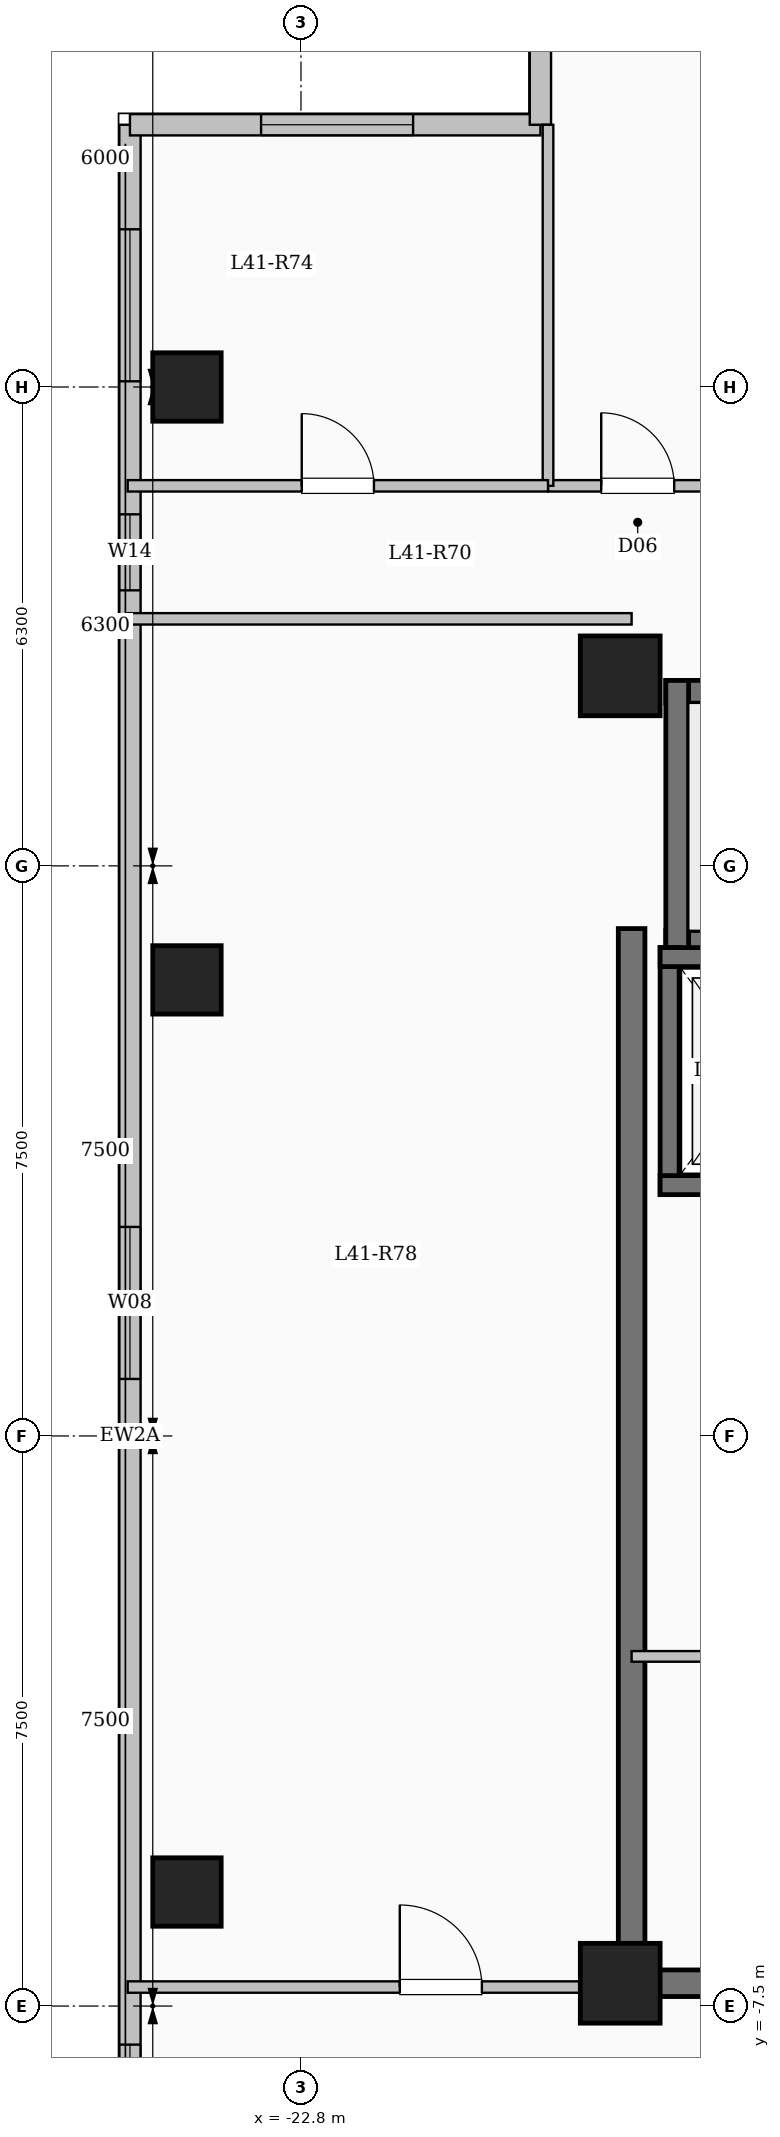
"""IFC4 building model, lengths in metres.
Left out: names, types, materials, properties, quantities, classifications, styles, units other than length and angle.
Written with IfcOpenShell. Run it as: python <this file> out.ifc"""

import sys

from ifc_helpers import new_model, si_unit, direction, frame, frame_2d, origin, origin_2d, place, context, subcontext, project, spatial, rectangle, extrude, element, fill, save


model = new_model("IFC4")
c1 = context("Model", 3, precision=1e-05, world=origin(), true_north=direction((0.0, 1.0)))
c2 = subcontext(c1, "Body", "Model", "MODEL_VIEW")
j1 = project(units=[si_unit("LENGTHUNIT", "METRE"), si_unit("PLANEANGLEUNIT", "RADIAN")], contexts=[c1])
p1 = place(None, origin())
s1 = spatial("IfcSite", under=j1, at=p1, CompositionType="ELEMENT")
p2 = place(p1, origin())
s2 = spatial("IfcBuilding", under=s1, at=p2, CompositionType="ELEMENT")
p3 = place(p2, frame((0.0, 0.0, 152.7)))
s3 = spatial("IfcBuildingStorey", under=s2, at=p3, CompositionType="ELEMENT", Elevation=152.7)
for number, where, z_axis, x_axis in (
    (1, (-18.6, -7.2, 0.0), (0.0, 0.0, 1.0), (1.0, 0.0, 0.0)),
    (2, (-18.6, 10.0, 0.0), (0.0, 0.0, 1.0), (1.0, 0.0, 0.0)),
):
    element("IfcColumn", number, at=place(p3, frame(where, z_axis=z_axis, x_axis=x_axis)), inside=s3, PredefinedType="COLUMN", context=c2, shape_type="SweptSolid", body=[
        extrude(rectangle(XDim=1.05, YDim=1.05, at=origin_2d()), origin(), (0.0, 0.0, 1.0), 3.35),
    ])
for number, where, z_axis, x_axis in (
    (3, (-24.3, -6.0, 0.0), (0.0, 0.0, 1.0), (1.0, 0.0, 0.0)),
    (4, (-24.3, 6.0, 0.0), (0.0, 0.0, 1.0), (1.0, 0.0, 0.0)),
    (5, (-24.3, 13.8, 0.0), (0.0, 0.0, 1.0), (1.0, 0.0, 0.0)),
):
    element("IfcColumn", number, at=place(p3, frame(where, z_axis=z_axis, x_axis=x_axis)), inside=s3, PredefinedType="COLUMN", context=c2, shape_type="SweptSolid", body=[
        extrude(rectangle(XDim=0.9, YDim=0.9, at=origin_2d()), origin(), (0.0, 0.0, 1.0), 3.35),
    ])
p4 = place(p3, frame((-25.05, -17.25, 0.0), z_axis=(0.0, 0.0, 1.0), x_axis=(0.0, 1.0, 0.0)))
e6 = element("IfcWall", 6, at=p4, inside=s3, PredefinedType="SOLIDWALL", context=c2, shape_type="SweptSolid", body=[
    extrude(rectangle(XDim=34.5, YDim=0.28, at=frame_2d((17.25, 0.0))), origin(), (0.0, 0.0, 1.0), 3.1),
])
p5 = place(p4, frame((2.35, 0.0, 0.9)))
e7 = element("IfcOpeningElement", 7, at=p5, cuts=e6, PredefinedType="OPENING", context=c2, shape_type="SweptSolid", body=[
    extrude(rectangle(XDim=2.2, YDim=1.75, at=frame_2d((1.1, 0.875))), frame((0.0, 0.15, 0.0), z_axis=(0.0, -1.0, 0.0), x_axis=(1.0, 0.0, 0.0)), (0.0, 0.0, 1.0), 0.3),
])
p6 = place(p4, frame((7.742, 0.0, 0.9)))
e8 = element("IfcOpeningElement", 8, at=p6, cuts=e6, PredefinedType="OPENING", context=c2, shape_type="SweptSolid", body=[
    extrude(rectangle(XDim=1.5, YDim=1.65, at=frame_2d((0.75, 0.825))), frame((0.0, 0.15, 0.0), z_axis=(0.0, -1.0, 0.0), x_axis=(1.0, 0.0, 0.0)), (0.0, 0.0, 1.0), 0.3),
])
p7 = place(p4, frame((18.0, 0.0, 0.9)))
e9 = element("IfcOpeningElement", 9, at=p7, cuts=e6, PredefinedType="OPENING", context=c2, shape_type="SweptSolid", body=[
    extrude(rectangle(XDim=2.0, YDim=1.7, at=frame_2d((1.0, 0.85))), frame((0.0, 0.15, 0.0), z_axis=(0.0, -1.0, 0.0), x_axis=(1.0, 0.0, 0.0)), (0.0, 0.0, 1.0), 0.3),
])
p8 = place(p4, frame((28.375, 0.0, 0.95)))
e10 = element("IfcOpeningElement", 10, at=p8, cuts=e6, PredefinedType="OPENING", context=c2, shape_type="SweptSolid", body=[
    extrude(rectangle(XDim=1.0, YDim=1.5, at=frame_2d((0.5, 0.75))), frame((0.0, 0.15, 0.0), z_axis=(0.0, -1.0, 0.0), x_axis=(1.0, 0.0, 0.0)), (0.0, 0.0, 1.0), 0.3),
])
p9 = place(p4, frame((31.125, 0.0, 0.9)))
e11 = element("IfcOpeningElement", 11, at=p9, cuts=e6, PredefinedType="OPENING", context=c2, shape_type="SweptSolid", body=[
    extrude(rectangle(XDim=2.0, YDim=1.7, at=frame_2d((1.0, 0.85))), frame((0.0, 0.15, 0.0), z_axis=(0.0, -1.0, 0.0), x_axis=(1.0, 0.0, 0.0)), (0.0, 0.0, 1.0), 0.3),
])
p10 = place(p3, frame((-25.05, 17.25, 0.0), z_axis=(0.0, 0.0, 1.0), x_axis=(1.0, 0.0, 0.0)))
e12 = element("IfcWall", 12, at=p10, inside=s3, PredefinedType="SOLIDWALL", context=c2, shape_type="SweptSolid", body=[
    extrude(rectangle(XDim=5.4, YDim=0.28, at=frame_2d((2.7, 0.0))), origin(), (0.0, 0.0, 1.0), 3.1),
])
p11 = place(p10, frame((1.725, 0.0, 0.9)))
e13 = element("IfcOpeningElement", 13, at=p11, cuts=e12, PredefinedType="OPENING", context=c2, shape_type="SweptSolid", body=[
    extrude(rectangle(XDim=2.0, YDim=1.7, at=frame_2d((1.0, 0.85))), frame((0.0, 0.15, 0.0), z_axis=(0.0, -1.0, 0.0), x_axis=(1.0, 0.0, 0.0)), (0.0, 0.0, 1.0), 0.3),
])
p12 = place(p3, frame((-19.65, 17.25, 0.0), z_axis=(0.0, 0.0, 1.0), x_axis=(0.0, 1.0, 0.0)))
e14 = element("IfcWall", 14, at=p12, inside=s3, PredefinedType="SOLIDWALL", context=c2, shape_type="SweptSolid", body=[
    extrude(rectangle(XDim=3.9, YDim=0.28, at=frame_2d((1.95, 0.0))), origin(), (0.0, 0.0, 1.0), 3.1),
])
p13 = place(p12, frame((1.107, 0.0, 0.9)))
e15 = element("IfcOpeningElement", 15, at=p13, cuts=e14, PredefinedType="OPENING", context=c2, shape_type="SweptSolid", body=[
    extrude(rectangle(XDim=1.65, YDim=1.6, at=frame_2d((0.825, 0.8))), frame((0.0, 0.15, 0.0), z_axis=(0.0, -1.0, 0.0), x_axis=(1.0, 0.0, 0.0)), (0.0, 0.0, 1.0), 0.3),
])
p14 = place(p3, frame((-18.0, 9.79, 0.0), z_axis=(0.0, 0.0, 1.0), x_axis=(1.0, 0.0, 0.0)))
e16 = element("IfcWall", 16, at=p14, inside=s3, PredefinedType="SHEAR", context=c2, shape_type="SweptSolid", body=[
    extrude(rectangle(XDim=8.0, YDim=0.3, at=frame_2d((4.0, 0.0))), origin(), (0.0, 0.0, 1.0), 3.35),
])
p15 = place(p3, frame((-18.0, 6.5, 0.0), z_axis=(0.0, 0.0, 1.0), x_axis=(1.0, 0.0, 0.0)))
e17 = element("IfcWall", 17, at=p15, inside=s3, PredefinedType="SHEAR", context=c2, shape_type="SweptSolid", body=[
    extrude(rectangle(XDim=8.0, YDim=0.3, at=frame_2d((4.0, 0.0))), origin(), (0.0, 0.0, 1.0), 3.35),
])
p16 = place(p15, frame((6.45, 0.0, 0.0)))
e18 = element("IfcOpeningElement", 18, at=p16, cuts=e17, PredefinedType="OPENING", context=c2, shape_type="SweptSolid", body=[
    extrude(rectangle(XDim=1.0, YDim=2.15, at=frame_2d((0.5, 1.075))), frame((0.0, 0.16, 0.0), z_axis=(0.0, -1.0, 0.0), x_axis=(1.0, 0.0, 0.0)), (0.0, 0.0, 1.0), 0.32),
])
p17 = place(p3, frame((-17.85, 6.35, 0.0), z_axis=(0.0, 0.0, 1.0), x_axis=(0.0, 1.0, 0.0)))
e19 = element("IfcWall", 19, at=p17, inside=s3, PredefinedType="SHEAR", context=c2, shape_type="SweptSolid", body=[
    extrude(rectangle(XDim=3.59, YDim=0.3, at=frame_2d((1.795, 0.0))), origin(), (0.0, 0.0, 1.0), 3.35),
])
p18 = place(p3, frame((-17.95, 3.175, 0.0), z_axis=(0.0, 0.0, 1.0), x_axis=(0.0, 1.0, 0.0)))
e20 = element("IfcWall", 20, at=p18, inside=s3, PredefinedType="SHEAR", context=c2, shape_type="SweptSolid", body=[
    extrude(rectangle(XDim=3.25, YDim=0.25, at=frame_2d((1.625, 0.0))), origin(), (0.0, 0.0, 1.0), 3.35),
])
for number, where, z_axis, x_axis in (
    (21, (-18.075, 3.3, 0.0), (0.0, 0.0, 1.0), (1.0, 0.0, 0.0)),
    (22, (-18.075, 6.3, 0.0), (0.0, 0.0, 1.0), (1.0, 0.0, 0.0)),
):
    element("IfcWall", number, at=place(p3, frame(where, z_axis=z_axis, x_axis=x_axis)), inside=s3, PredefinedType="SHEAR", context=c2, shape_type="SweptSolid", body=[
        extrude(rectangle(XDim=2.55, YDim=0.25, at=frame_2d((1.275, 0.0))), origin(), (0.0, 0.0, 1.0), 3.35),
    ])
p19 = place(p3, frame((-18.45, -7.375, 0.0), z_axis=(0.0, 0.0, 1.0), x_axis=(0.0, 1.0, 0.0)))
e23 = element("IfcWall", 23, at=p19, inside=s3, PredefinedType="SHEAR", context=c2, shape_type="SweptSolid", body=[
    extrude(rectangle(XDim=14.05, YDim=0.35, at=frame_2d((7.025, 0.0))), origin(), (0.0, 0.0, 1.0), 3.35),
])
p20 = place(p3, frame((-18.625, -7.2, 0.0), z_axis=(0.0, 0.0, 1.0), x_axis=(1.0, 0.0, 0.0)))
e24 = element("IfcWall", 24, at=p20, inside=s3, PredefinedType="SHEAR", context=c2, shape_type="SweptSolid", body=[
    extrude(rectangle(XDim=8.55, YDim=0.35, at=frame_2d((4.275, 0.0))), origin(), (0.0, 0.0, 1.0), 3.35),
])
p21 = place(p3, frame((-18.45, -2.9, 0.0), z_axis=(0.0, 0.0, 1.0), x_axis=(1.0, 0.0, 0.0)))
e25 = element("IfcWall", 25, at=p21, inside=s3, PredefinedType="PARTITIONING", context=c2, shape_type="SweptSolid", body=[
    extrude(rectangle(XDim=3.05, YDim=0.14, at=frame_2d((1.525, 0.0))), origin(), (0.0, 0.0, 1.0), 3.1),
])
p22 = place(p21, frame((1.05, 0.0, 0.0)))
e26 = element("IfcOpeningElement", 26, at=p22, cuts=e25, PredefinedType="OPENING", context=c2, shape_type="SweptSolid", body=[
    extrude(rectangle(XDim=0.9, YDim=2.08, at=frame_2d((0.45, 1.04))), frame((0.0, 0.08, 0.0), z_axis=(0.0, -1.0, 0.0), x_axis=(1.0, 0.0, 0.0)), (0.0, 0.0, 1.0), 0.16),
])
p23 = place(p3, frame((-19.55, 12.5, 0.0), z_axis=(0.0, 0.0, 1.0), x_axis=(1.0, 0.0, 0.0)))
e27 = element("IfcWall", 27, at=p23, inside=s3, PredefinedType="PARTITIONING", context=c2, shape_type="SweptSolid", body=[
    extrude(rectangle(XDim=15.7, YDim=0.15, at=frame_2d((7.85, 0.0))), origin(), (0.0, 0.0, 1.0), 3.1),
])
p24 = place(p23, frame((0.7, 0.0, 0.0)))
e28 = element("IfcOpeningElement", 28, at=p24, cuts=e27, PredefinedType="OPENING", context=c2, shape_type="SweptSolid", body=[
    extrude(rectangle(XDim=0.96, YDim=2.15, at=frame_2d((0.48, 1.075))), frame((0.0, 0.085, 0.0), z_axis=(0.0, -1.0, 0.0), x_axis=(1.0, 0.0, 0.0)), (0.0, 0.0, 1.0), 0.17),
])
p25 = place(p23, frame((10.348, 0.0, 0.0)))
e29 = element("IfcOpeningElement", 29, at=p25, cuts=e27, PredefinedType="OPENING", context=c2, shape_type="SweptSolid", body=[
    extrude(rectangle(XDim=0.96, YDim=2.15, at=frame_2d((0.48, 1.075))), frame((0.0, 0.085, 0.0), z_axis=(0.0, -1.0, 0.0), x_axis=(1.0, 0.0, 0.0)), (0.0, 0.0, 1.0), 0.17),
])
p26 = place(p3, frame((-25.08, -7.25, 0.0), z_axis=(0.0, 0.0, 1.0), x_axis=(1.0, 0.0, 0.0)))
e30 = element("IfcWall", 30, at=p26, inside=s3, PredefinedType="PARTITIONING", context=c2, shape_type="SweptSolid", body=[
    extrude(rectangle(XDim=6.63, YDim=0.15, at=frame_2d((3.315, 0.0))), origin(), (0.0, 0.0, 1.0), 3.1),
])
p27 = place(p26, frame((3.58, 0.0, 0.0)))
e31 = element("IfcOpeningElement", 31, at=p27, cuts=e30, PredefinedType="OPENING", context=c2, shape_type="SweptSolid", body=[
    extrude(rectangle(XDim=1.08, YDim=2.15, at=frame_2d((0.54, 1.075))), frame((0.0, 0.085, 0.0), z_axis=(0.0, -1.0, 0.0), x_axis=(1.0, 0.0, 0.0)), (0.0, 0.0, 1.0), 0.17),
])
p28 = place(p3, frame((-25.08, 10.75, 0.0), z_axis=(0.0, 0.0, 1.0), x_axis=(1.0, 0.0, 0.0)))
e32 = element("IfcWall", 32, at=p28, inside=s3, PredefinedType="PARTITIONING", context=c2, shape_type="SweptSolid", body=[
    extrude(rectangle(XDim=6.63, YDim=0.15, at=frame_2d((3.315, 0.0))), origin(), (0.0, 0.0, 1.0), 3.1),
])
p29 = place(p3, frame((-19.55, 12.5, 0.0), z_axis=(0.0, 0.0, 1.0), x_axis=(0.0, 1.0, 0.0)))
e33 = element("IfcWall", 33, at=p29, inside=s3, PredefinedType="PARTITIONING", context=c2, shape_type="SweptSolid", body=[
    extrude(rectangle(XDim=4.75, YDim=0.14, at=frame_2d((2.375, 0.0))), origin(), (0.0, 0.0, 1.0), 3.1),
])
p30 = place(p3, frame((-25.08, 12.5, 0.0), z_axis=(0.0, 0.0, 1.0), x_axis=(1.0, 0.0, 0.0)))
e34 = element("IfcWall", 34, at=p30, inside=s3, PredefinedType="PARTITIONING", context=c2, shape_type="SweptSolid", body=[
    extrude(rectangle(XDim=5.53, YDim=0.15, at=frame_2d((2.765, 0.0))), origin(), (0.0, 0.0, 1.0), 3.1),
])
p31 = place(p30, frame((2.29, 0.0, 0.0)))
e35 = element("IfcOpeningElement", 35, at=p31, cuts=e34, PredefinedType="OPENING", context=c2, shape_type="SweptSolid", body=[
    extrude(rectangle(XDim=0.95, YDim=2.15, at=frame_2d((0.475, 1.075))), frame((0.0, 0.085, 0.0), z_axis=(0.0, -1.0, 0.0), x_axis=(1.0, 0.0, 0.0)), (0.0, 0.0, 1.0), 0.17),
])
p32 = place(p6, origin())
e36 = element("IfcWindow", 36, at=p32, inside=s3, PartitioningType="SINGLE_PANEL", PredefinedType="WINDOW", context=c2, shape_type="SweptSolid", body=[
    extrude(rectangle(XDim=1.5, YDim=1.65, at=frame_2d((0.75, 0.825))), frame((0.0, 0.03, 0.0), z_axis=(0.0, -1.0, 0.0), x_axis=(1.0, 0.0, 0.0)), (0.0, 0.0, 1.0), 0.06),
])
fill(e8, e36)
p33 = place(p7, origin())
e37 = element("IfcWindow", 37, at=p33, inside=s3, PartitioningType="SINGLE_PANEL", PredefinedType="WINDOW", context=c2, shape_type="SweptSolid", body=[
    extrude(rectangle(XDim=2.0, YDim=1.7, at=frame_2d((1.0, 0.85))), frame((0.0, 0.03, 0.0), z_axis=(0.0, -1.0, 0.0), x_axis=(1.0, 0.0, 0.0)), (0.0, 0.0, 1.0), 0.06),
])
fill(e9, e37)
p34 = place(p8, origin())
e38 = element("IfcWindow", 38, at=p34, inside=s3, PartitioningType="SINGLE_PANEL", PredefinedType="WINDOW", context=c2, shape_type="SweptSolid", body=[
    extrude(rectangle(XDim=1.0, YDim=1.5, at=frame_2d((0.5, 0.75))), frame((0.0, 0.03, 0.0), z_axis=(0.0, -1.0, 0.0), x_axis=(1.0, 0.0, 0.0)), (0.0, 0.0, 1.0), 0.06),
])
fill(e10, e38)
p35 = place(p9, origin())
e39 = element("IfcWindow", 39, at=p35, inside=s3, PartitioningType="SINGLE_PANEL", PredefinedType="WINDOW", context=c2, shape_type="SweptSolid", body=[
    extrude(rectangle(XDim=2.0, YDim=1.7, at=frame_2d((1.0, 0.85))), frame((0.0, 0.03, 0.0), z_axis=(0.0, -1.0, 0.0), x_axis=(1.0, 0.0, 0.0)), (0.0, 0.0, 1.0), 0.06),
])
fill(e11, e39)
p36 = place(p11, origin())
e40 = element("IfcWindow", 40, at=p36, inside=s3, PartitioningType="SINGLE_PANEL", PredefinedType="WINDOW", context=c2, shape_type="SweptSolid", body=[
    extrude(rectangle(XDim=2.0, YDim=1.7, at=frame_2d((1.0, 0.85))), frame((0.0, 0.03, 0.0), z_axis=(0.0, -1.0, 0.0), x_axis=(1.0, 0.0, 0.0)), (0.0, 0.0, 1.0), 0.06),
])
fill(e13, e40)
p37 = place(p24, origin())
e41 = element("IfcDoor", 41, at=p37, inside=s3, OperationType="SINGLE_SWING_LEFT", PredefinedType="DOOR", context=c2, shape_type="SweptSolid", body=[
    extrude(rectangle(XDim=0.96, YDim=2.15, at=frame_2d((0.48, 1.075))), frame((0.0, 0.025, 0.0), z_axis=(0.0, -1.0, 0.0), x_axis=(1.0, 0.0, 0.0)), (0.0, 0.0, 1.0), 0.05),
])
fill(e28, e41)
p38 = place(p31, origin())
e42 = element("IfcDoor", 42, at=p38, inside=s3, OperationType="SINGLE_SWING_LEFT", PredefinedType="DOOR", context=c2, shape_type="SweptSolid", body=[
    extrude(rectangle(XDim=0.95, YDim=2.15, at=frame_2d((0.475, 1.075))), frame((0.0, 0.025, 0.0), z_axis=(0.0, -1.0, 0.0), x_axis=(1.0, 0.0, 0.0)), (0.0, 0.0, 1.0), 0.05),
])
fill(e35, e42)
p39 = place(p27, origin())
e43 = element("IfcDoor", 43, at=p39, inside=s3, OperationType="SINGLE_SWING_LEFT", PredefinedType="DOOR", context=c2, shape_type="SweptSolid", body=[
    extrude(rectangle(XDim=1.08, YDim=2.15, at=frame_2d((0.54, 1.075))), frame((0.0, 0.025, 0.0), z_axis=(0.0, -1.0, 0.0), x_axis=(1.0, 0.0, 0.0)), (0.0, 0.0, 1.0), 0.05),
])
fill(e31, e43)
save(model, sys.argv[1])
